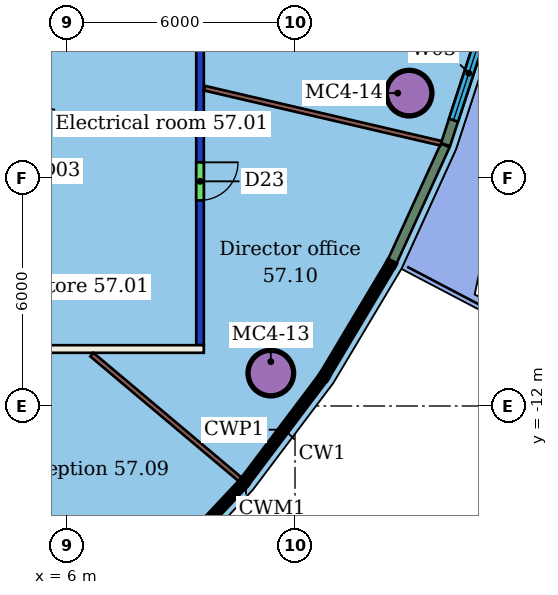
"""IFC4 building model, lengths in metres.
Left out: names, types, materials, properties, quantities, classifications, styles, units other than length and angle.
Written with IfcOpenShell. Run it as: python <this file> out.ifc"""

import sys

from ifc_helpers import new_model, si_unit, direction, frame, frame_2d, origin, origin_2d, place, context, subcontext, project, spatial, rectangle, hollow_circle, extrude, element, fill, save


model = new_model("IFC4")
c1 = context("Model", 3, precision=1e-05, world=origin(), true_north=direction((0.0, 1.0)))
c2 = subcontext(c1, "Body", "Model", "MODEL_VIEW")
j1 = project(units=[si_unit("LENGTHUNIT", "METRE"), si_unit("PLANEANGLEUNIT", "RADIAN")], contexts=[c1])
p1 = place(None, origin())
s1 = spatial("IfcSite", under=j1, at=p1, CompositionType="ELEMENT")
p2 = place(p1, origin())
s2 = spatial("IfcBuilding", under=s1, at=p2, CompositionType="ELEMENT")
p3 = place(p2, frame((0.0, 0.0, 231.7)))
s3 = spatial("IfcBuildingStorey", under=s2, at=p3, CompositionType="ELEMENT", Elevation=231.7)
for number, where, z_axis, x_axis in (
    (1, (11.363, -11.134, 0.0), (0.0, 0.0, 1.0), (1.0, 0.0, 0.0)),
    (2, (15.003, -3.768, 0.0), (0.0, 0.0, 1.0), (1.0, 0.0, 0.0)),
):
    element("IfcColumn", number, at=place(p3, frame(where, z_axis=z_axis, x_axis=x_axis)), inside=s3, PredefinedType="COLUMN", context=c2, shape_type="SweptSolid", body=[
        extrude(hollow_circle(Radius=0.6, WallThickness=0.045, at=origin_2d()), origin(), (0.0, 0.0, 1.0), 3.45),
    ])
p4 = place(p3, frame((9.6, -10.5, 0.0), z_axis=(0.0, 0.0, 1.0), x_axis=(-1.0, 0.0, 0.0)))
e3 = element("IfcWall", 3, at=p4, inside=s3, PredefinedType="PARTITIONING", context=c2, shape_type="SweptSolid", body=[
    extrude(rectangle(XDim=31.2, YDim=0.2, at=frame_2d((15.6, 0.0))), origin(), (0.0, 0.0, 1.0), 3.45),
])
p5 = place(p4, frame((26.389, 0.0, 0.0)))
e4 = element("IfcOpeningElement", 4, at=p5, cuts=e3, PredefinedType="OPENING", context=c2, shape_type="SweptSolid", body=[
    extrude(rectangle(XDim=1.0, YDim=2.4, at=frame_2d((0.5, 1.2))), frame((0.0, 0.11, 0.0), z_axis=(0.0, -1.0, 0.0), x_axis=(1.0, 0.0, 0.0)), (0.0, 0.0, 1.0), 0.22),
])
p6 = place(p4, frame((19.969, 0.0, 0.0)))
e5 = element("IfcOpeningElement", 5, at=p6, cuts=e3, PredefinedType="OPENING", context=c2, shape_type="SweptSolid", body=[
    extrude(rectangle(XDim=1.5, YDim=2.1, at=frame_2d((0.75, 1.05))), frame((0.0, 0.11, 0.0), z_axis=(0.0, -1.0, 0.0), x_axis=(1.0, 0.0, 0.0)), (0.0, 0.0, 1.0), 0.22),
])
p7 = place(p4, frame((16.344, 0.0, 0.0)))
e6 = element("IfcOpeningElement", 6, at=p7, cuts=e3, PredefinedType="OPENING", context=c2, shape_type="SweptSolid", body=[
    extrude(rectangle(XDim=1.0, YDim=2.4, at=frame_2d((0.5, 1.2))), frame((0.0, 0.11, 0.0), z_axis=(0.0, -1.0, 0.0), x_axis=(1.0, 0.0, 0.0)), (0.0, 0.0, 1.0), 0.22),
])
p8 = place(p4, frame((10.549, 0.0, 0.0)))
e7 = element("IfcOpeningElement", 7, at=p8, cuts=e3, PredefinedType="OPENING", context=c2, shape_type="SweptSolid", body=[
    extrude(rectangle(XDim=0.9, YDim=2.1, at=frame_2d((0.45, 1.05))), frame((0.0, 0.11, 0.0), z_axis=(0.0, -1.0, 0.0), x_axis=(1.0, 0.0, 0.0)), (0.0, 0.0, 1.0), 0.22),
])
p9 = place(p4, frame((6.228, 0.0, 0.0)))
e8 = element("IfcOpeningElement", 8, at=p9, cuts=e3, PredefinedType="OPENING", context=c2, shape_type="SweptSolid", body=[
    extrude(rectangle(XDim=1.2, YDim=2.4, at=frame_2d((0.6, 1.2))), frame((0.0, 0.11, 0.0), z_axis=(0.0, -1.0, 0.0), x_axis=(1.0, 0.0, 0.0)), (0.0, 0.0, 1.0), 0.22),
])
p10 = place(p3, frame((9.5, 10.4, 0.0), z_axis=(0.0, 0.0, 1.0), x_axis=(0.0, -1.0, 0.0)))
e9 = element("IfcWall", 9, at=p10, inside=s3, PredefinedType="PARTITIONING", context=c2, shape_type="SweptSolid", body=[
    extrude(rectangle(XDim=20.8, YDim=0.2, at=frame_2d((10.4, 0.0))), origin(), (0.0, 0.0, 1.0), 3.05),
])
p11 = place(p10, frame((15.989, 0.0, 0.0)))
e10 = element("IfcOpeningElement", 10, at=p11, cuts=e9, PredefinedType="OPENING", context=c2, shape_type="SweptSolid", body=[
    extrude(rectangle(XDim=1.0, YDim=2.4, at=frame_2d((0.5, 1.2))), frame((0.0, 0.11, 0.0), z_axis=(0.0, -1.0, 0.0), x_axis=(1.0, 0.0, 0.0)), (0.0, 0.0, 1.0), 0.22),
])
p12 = place(p10, frame((11.814, 0.0, 0.0)))
e11 = element("IfcOpeningElement", 11, at=p12, cuts=e9, PredefinedType="OPENING", context=c2, shape_type="SweptSolid", body=[
    extrude(rectangle(XDim=1.0, YDim=2.4, at=frame_2d((0.5, 1.2))), frame((0.0, 0.11, 0.0), z_axis=(0.0, -1.0, 0.0), x_axis=(1.0, 0.0, 0.0)), (0.0, 0.0, 1.0), 0.22),
])
p13 = place(p10, frame((6.499, 0.0, 0.0)))
e12 = element("IfcOpeningElement", 12, at=p13, cuts=e9, PredefinedType="OPENING", context=c2, shape_type="SweptSolid", body=[
    extrude(rectangle(XDim=0.9, YDim=2.1, at=frame_2d((0.45, 1.05))), frame((0.0, 0.11, 0.0), z_axis=(0.0, -1.0, 0.0), x_axis=(1.0, 0.0, 0.0)), (0.0, 0.0, 1.0), 0.22),
])
p14 = place(p10, frame((2.673, 0.0, 0.0)))
e13 = element("IfcOpeningElement", 13, at=p14, cuts=e9, PredefinedType="OPENING", context=c2, shape_type="SweptSolid", body=[
    extrude(rectangle(XDim=1.2, YDim=2.4, at=frame_2d((0.6, 1.2))), frame((0.0, 0.11, 0.0), z_axis=(0.0, -1.0, 0.0), x_axis=(1.0, 0.0, 0.0)), (0.0, 0.0, 1.0), 0.22),
])
p15 = place(p3, frame((5.564, -18.722, 0.0), z_axis=(0.0, 0.0, 1.0), x_axis=(-0.525503275837, 0.850791576759, 0.0)))
e14 = element("IfcWall", 14, at=p15, inside=s3, PredefinedType="PARTITIONING", context=c2, shape_type="SweptSolid", body=[
    extrude(rectangle(XDim=9.5, YDim=0.15, at=frame_2d((4.75, 0.0))), origin(), (0.0, 0.0, 1.0), 3.45),
])
p16 = place(p3, frame((10.561, -13.936, 0.0), z_axis=(0.0, 0.0, 1.0), x_axis=(-0.765140481773, 0.643863373048, 0.0)))
e15 = element("IfcWall", 15, at=p16, inside=s3, PredefinedType="PARTITIONING", context=c2, shape_type="SweptSolid", body=[
    extrude(rectangle(XDim=5.107, YDim=0.125, at=frame_2d((2.554, 0.0))), origin(), (0.0, 0.0, 1.0), 3.45),
])
p17 = place(p3, frame((15.841, -5.087, 0.0), z_axis=(0.0, 0.0, 1.0), x_axis=(-0.973929013139, 0.226852986241, 0.0)))
e16 = element("IfcWall", 16, at=p17, inside=s3, PredefinedType="PARTITIONING", context=c2, shape_type="SweptSolid", body=[
    extrude(rectangle(XDim=6.394, YDim=0.125, at=frame_2d((3.197, 0.0))), origin(), (0.0, 0.0, 1.0), 3.45),
])
p18 = place(p3, frame((14.556, -8.202, 0.0), z_axis=(0.0, 0.0, 1.0), x_axis=(0.415284514337, 0.909691580785, 0.0)))
e17 = element("IfcWall", 17, at=p18, inside=s3, PredefinedType="SOLIDWALL", context=c2, shape_type="SweptSolid", body=[
    extrude(rectangle(XDim=3.363, YDim=0.25, at=frame_2d((1.682, 0.0))), origin(), (0.0, 0.0, 1.0), 3.1),
])
p19 = place(p3, frame((15.961, -5.122, 0.0), z_axis=(0.0, 0.0, 1.0), x_axis=(0.310298321168, 0.950639233295, 0.0)))
e18 = element("IfcWall", 18, at=p19, inside=s3, PredefinedType="SOLIDWALL", context=c2, shape_type="SweptSolid", body=[
    extrude(rectangle(XDim=3.351, YDim=0.25, at=frame_2d((1.676, 0.0))), origin(), (0.0, 0.0, 1.0), 3.1),
])
p20 = place(p19, frame((0.676, 0.0, 0.9)))
e19 = element("IfcOpeningElement", 19, at=p20, cuts=e18, PredefinedType="OPENING", context=c2, shape_type="SweptSolid", body=[
    extrude(rectangle(XDim=2.0, YDim=2.1, at=frame_2d((1.0, 1.05))), frame((0.0, 0.135, 0.0), z_axis=(0.0, -1.0, 0.0), x_axis=(1.0, 0.0, 0.0)), (0.0, 0.0, 1.0), 0.27),
])
p21 = place(p11, origin())
e20 = element("IfcDoor", 20, at=p21, inside=s3, OperationType="SINGLE_SWING_LEFT", PredefinedType="DOOR", context=c2, shape_type="SweptSolid", body=[
    extrude(rectangle(XDim=1.0, YDim=2.4, at=frame_2d((0.5, 1.2))), frame((0.0, 0.025, 0.0), z_axis=(0.0, -1.0, 0.0), x_axis=(1.0, 0.0, 0.0)), (0.0, 0.0, 1.0), 0.05),
])
fill(e10, e20)
p22 = place(p20, origin())
e21 = element("IfcWindow", 21, at=p22, inside=s3, PartitioningType="SINGLE_PANEL", PredefinedType="WINDOW", context=c2, shape_type="SweptSolid", body=[
    extrude(rectangle(XDim=2.0, YDim=2.1, at=frame_2d((1.0, 1.05))), frame((0.0, 0.03, 0.0), z_axis=(0.0, -1.0, 0.0), x_axis=(1.0, 0.0, 0.0)), (0.0, 0.0, 1.0), 0.06),
])
fill(e19, e21)
save(model, sys.argv[1])
